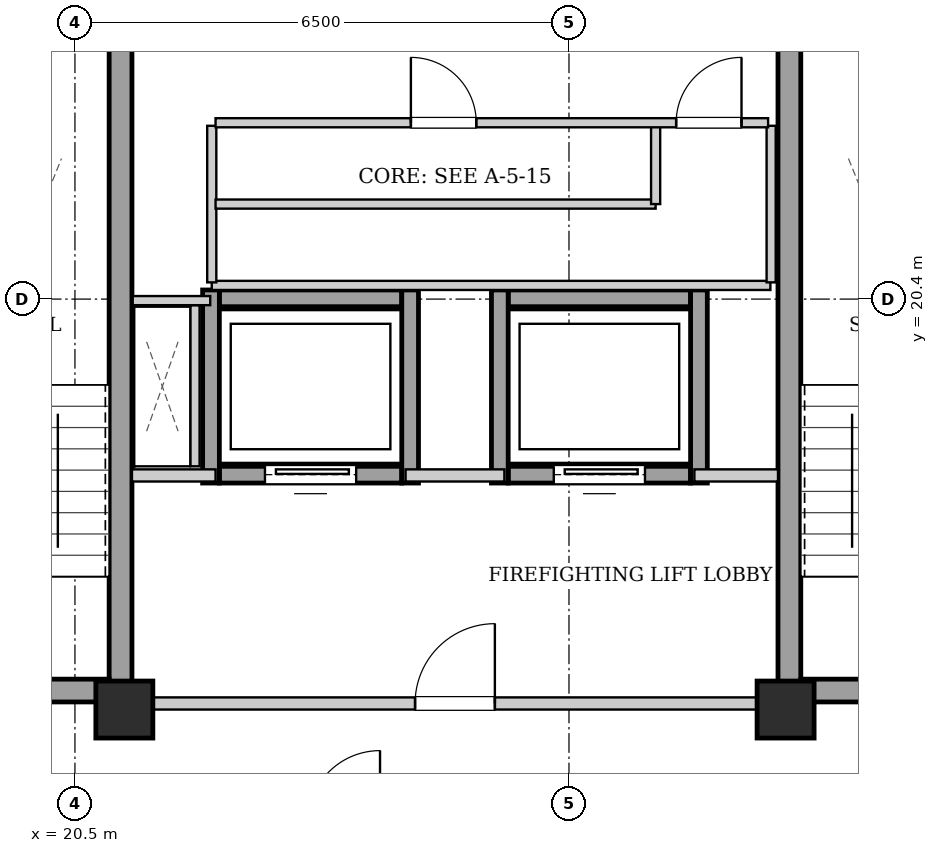
"""IFC4 building model, lengths in metres.
Left out: names, types, materials, properties, quantities, classifications, styles, units other than length and angle.
Written with IfcOpenShell. Run it as: python <this file> out.ifc"""

import sys

from ifc_helpers import new_model, si_unit, direction, frame, frame_2d, origin, origin_2d, place, context, subcontext, project, spatial, rectangle, extrude, element, fill, save


model = new_model("IFC4")
c1 = context("Model", 3, precision=1e-05, world=origin(), true_north=direction((0.0, 1.0)))
c2 = subcontext(c1, "Body", "Model", "MODEL_VIEW")
j1 = project(units=[si_unit("LENGTHUNIT", "METRE"), si_unit("PLANEANGLEUNIT", "RADIAN")], contexts=[c1])
p1 = place(None, origin())
s1 = spatial("IfcSite", under=j1, at=p1, CompositionType="ELEMENT")
p2 = place(p1, origin())
s2 = spatial("IfcBuilding", under=s1, at=p2, CompositionType="ELEMENT")
p3 = place(p2, frame((0.0, 0.0, 241.1)))
s3 = spatial("IfcBuildingStorey", under=s2, at=p3, CompositionType="ELEMENT", Elevation=241.1)
for number, where, z_axis, x_axis in (
    (1, (21.15, 15.0, 0.0), (0.0, 0.0, 1.0), (1.0, 0.0, 0.0)),
    (2, (29.85, 15.0, 0.0), (0.0, 0.0, 1.0), (1.0, 0.0, 0.0)),
):
    element("IfcColumn", number, at=place(p3, frame(where, z_axis=z_axis, x_axis=x_axis)), inside=s3, PredefinedType="COLUMN", context=c2, shape_type="SweptSolid", body=[
        extrude(rectangle(XDim=0.75, YDim=0.75, at=origin_2d()), origin(), (0.0, 0.0, 1.0), 3.4),
    ])
p4 = place(p3, frame((21.1, 15.1, 0.0), z_axis=(0.0, 0.0, 1.0), x_axis=(0.0, 1.0, 0.0)))
e3 = element("IfcWall", 3, at=p4, inside=s3, PredefinedType="SHEAR", context=c2, shape_type="SweptSolid", body=[
    extrude(rectangle(XDim=9.0, YDim=0.3, at=frame_2d((4.5, 0.0))), origin(), (0.0, 0.0, 1.0), 3.14),
])
p5 = place(p3, frame((18.1, 15.25, 0.0), z_axis=(0.0, 0.0, 1.0), x_axis=(1.0, 0.0, 0.0)))
e4 = element("IfcWall", 4, at=p5, inside=s3, PredefinedType="SHEAR", context=c2, shape_type="SweptSolid", body=[
    extrude(rectangle(XDim=2.85, YDim=0.3, at=frame_2d((1.425, 0.0))), origin(), (0.0, 0.0, 1.0), 3.14),
])
p6 = place(p5, frame((0.86, 0.0, 0.0)))
e5 = element("IfcOpeningElement", 5, at=p6, cuts=e4, PredefinedType="OPENING", context=c2, shape_type="SweptSolid", body=[
    extrude(rectangle(XDim=1.1, YDim=2.05, at=frame_2d((0.55, 1.025))), frame((0.0, 0.16, 0.0), z_axis=(0.0, -1.0, 0.0), x_axis=(1.0, 0.0, 0.0)), (0.0, 0.0, 1.0), 0.32),
])
p7 = place(p3, frame((29.9, 15.1, 0.0), z_axis=(0.0, 0.0, 1.0), x_axis=(0.0, 1.0, 0.0)))
e6 = element("IfcWall", 6, at=p7, inside=s3, PredefinedType="SHEAR", context=c2, shape_type="SweptSolid", body=[
    extrude(rectangle(XDim=9.0, YDim=0.3, at=frame_2d((4.5, 0.0))), origin(), (0.0, 0.0, 1.0), 3.14),
])
p8 = place(p3, frame((30.05, 15.25, 0.0), z_axis=(0.0, 0.0, 1.0), x_axis=(1.0, 0.0, 0.0)))
e7 = element("IfcWall", 7, at=p8, inside=s3, PredefinedType="SHEAR", context=c2, shape_type="SweptSolid", body=[
    extrude(rectangle(XDim=2.85, YDim=0.3, at=frame_2d((1.425, 0.0))), origin(), (0.0, 0.0, 1.0), 3.14),
])
p9 = place(p8, frame((0.86, 0.0, 0.0)))
e8 = element("IfcOpeningElement", 8, at=p9, cuts=e7, PredefinedType="OPENING", context=c2, shape_type="SweptSolid", body=[
    extrude(rectangle(XDim=1.1, YDim=2.05, at=frame_2d((0.55, 1.025))), frame((0.0, 0.16, 0.0), z_axis=(0.0, -1.0, 0.0), x_axis=(1.0, 0.0, 0.0)), (0.0, 0.0, 1.0), 0.32),
])
p10 = place(p3, frame((22.4, 18.09, 0.0), z_axis=(0.0, 0.0, 1.0), x_axis=(1.0, 0.0, 0.0)))
e9 = element("IfcWall", 9, at=p10, inside=s3, PredefinedType="SHEAR", context=c2, shape_type="SweptSolid", body=[
    extrude(rectangle(XDim=2.4, YDim=0.22, at=frame_2d((1.2, 0.0))), origin(), (0.0, 0.0, 1.0), 3.14),
])
p11 = place(p10, frame((0.6, 0.0, 0.0)))
e10 = element("IfcOpeningElement", 10, at=p11, cuts=e9, PredefinedType="OPENING", context=c2, shape_type="SweptSolid", body=[
    extrude(rectangle(XDim=1.2, YDim=2.15, at=frame_2d((0.6, 1.075))), frame((0.0, 0.12, 0.0), z_axis=(0.0, -1.0, 0.0), x_axis=(1.0, 0.0, 0.0)), (0.0, 0.0, 1.0), 0.24),
])
p12 = place(p3, frame((22.4, 20.41, 0.0), z_axis=(0.0, 0.0, 1.0), x_axis=(1.0, 0.0, 0.0)))
e11 = element("IfcWall", 11, at=p12, inside=s3, PredefinedType="SHEAR", context=c2, shape_type="SweptSolid", body=[
    extrude(rectangle(XDim=2.4, YDim=0.22, at=frame_2d((1.2, 0.0))), origin(), (0.0, 0.0, 1.0), 3.14),
])
for number, where, z_axis, x_axis in (
    (12, (22.29, 17.98, 0.0), (0.0, 0.0, 1.0), (0.0, 1.0, 0.0)),
    (13, (24.91, 17.98, 0.0), (0.0, 0.0, 1.0), (0.0, 1.0, 0.0)),
):
    element("IfcWall", number, at=place(p3, frame(where, z_axis=z_axis, x_axis=x_axis)), inside=s3, PredefinedType="SHEAR", context=c2, shape_type="SweptSolid", body=[
        extrude(rectangle(XDim=2.54, YDim=0.22, at=frame_2d((1.27, 0.0))), origin(), (0.0, 0.0, 1.0), 3.14),
    ])
p13 = place(p3, frame((26.2, 18.09, 0.0), z_axis=(0.0, 0.0, 1.0), x_axis=(1.0, 0.0, 0.0)))
e14 = element("IfcWall", 14, at=p13, inside=s3, PredefinedType="SHEAR", context=c2, shape_type="SweptSolid", body=[
    extrude(rectangle(XDim=2.4, YDim=0.22, at=frame_2d((1.2, 0.0))), origin(), (0.0, 0.0, 1.0), 3.14),
])
p14 = place(p13, frame((0.6, 0.0, 0.0)))
e15 = element("IfcOpeningElement", 15, at=p14, cuts=e14, PredefinedType="OPENING", context=c2, shape_type="SweptSolid", body=[
    extrude(rectangle(XDim=1.2, YDim=2.15, at=frame_2d((0.6, 1.075))), frame((0.0, 0.12, 0.0), z_axis=(0.0, -1.0, 0.0), x_axis=(1.0, 0.0, 0.0)), (0.0, 0.0, 1.0), 0.24),
])
p15 = place(p3, frame((26.2, 20.41, 0.0), z_axis=(0.0, 0.0, 1.0), x_axis=(1.0, 0.0, 0.0)))
e16 = element("IfcWall", 16, at=p15, inside=s3, PredefinedType="SHEAR", context=c2, shape_type="SweptSolid", body=[
    extrude(rectangle(XDim=2.4, YDim=0.22, at=frame_2d((1.2, 0.0))), origin(), (0.0, 0.0, 1.0), 3.14),
])
for number, where, z_axis, x_axis in (
    (17, (26.09, 17.98, 0.0), (0.0, 0.0, 1.0), (0.0, 1.0, 0.0)),
    (18, (28.71, 17.98, 0.0), (0.0, 0.0, 1.0), (0.0, 1.0, 0.0)),
):
    element("IfcWall", number, at=place(p3, frame(where, z_axis=z_axis, x_axis=x_axis)), inside=s3, PredefinedType="SHEAR", context=c2, shape_type="SweptSolid", body=[
        extrude(rectangle(XDim=2.54, YDim=0.22, at=frame_2d((1.27, 0.0))), origin(), (0.0, 0.0, 1.0), 3.14),
    ])
p16 = place(p3, frame((21.25, 15.08, 0.0), z_axis=(0.0, 0.0, 1.0), x_axis=(1.0, 0.0, 0.0)))
e19 = element("IfcWall", 19, at=p16, inside=s3, PredefinedType="PARTITIONING", context=c2, shape_type="SweptSolid", body=[
    extrude(rectangle(XDim=8.5, YDim=0.16, at=frame_2d((4.25, 0.0))), origin(), (0.0, 0.0, 1.0), 2.668),
])
p17 = place(p16, frame((3.725, 0.0, 0.0)))
e20 = element("IfcOpeningElement", 20, at=p17, cuts=e19, PredefinedType="OPENING", context=c2, shape_type="SweptSolid", body=[
    extrude(rectangle(XDim=1.05, YDim=2.05, at=frame_2d((0.525, 1.025))), frame((0.0, 0.09, 0.0), z_axis=(0.0, -1.0, 0.0), x_axis=(1.0, 0.0, 0.0)), (0.0, 0.0, 1.0), 0.18),
])
p18 = place(p3, frame((21.25, 18.08, 0.0), z_axis=(0.0, 0.0, 1.0), x_axis=(1.0, 0.0, 0.0)))
e21 = element("IfcWall", 21, at=p18, inside=s3, PredefinedType="PARTITIONING", context=c2, shape_type="SweptSolid", body=[
    extrude(rectangle(XDim=1.1, YDim=0.16, at=frame_2d((0.55, 0.0))), origin(), (0.0, 0.0, 1.0), 3.14),
])
p19 = place(p3, frame((24.85, 18.08, 0.0), z_axis=(0.0, 0.0, 1.0), x_axis=(1.0, 0.0, 0.0)))
e22 = element("IfcWall", 22, at=p19, inside=s3, PredefinedType="PARTITIONING", context=c2, shape_type="SweptSolid", body=[
    extrude(rectangle(XDim=1.3, YDim=0.16, at=frame_2d((0.65, 0.0))), origin(), (0.0, 0.0, 1.0), 3.14),
])
p20 = place(p3, frame((28.65, 18.08, 0.0), z_axis=(0.0, 0.0, 1.0), x_axis=(1.0, 0.0, 0.0)))
e23 = element("IfcWall", 23, at=p20, inside=s3, PredefinedType="PARTITIONING", context=c2, shape_type="SweptSolid", body=[
    extrude(rectangle(XDim=1.1, YDim=0.16, at=frame_2d((0.55, 0.0))), origin(), (0.0, 0.0, 1.0), 3.14),
])
p21 = place(p3, frame((22.08, 18.2, 0.0), z_axis=(0.0, 0.0, 1.0), x_axis=(0.0, 1.0, 0.0)))
e24 = element("IfcWall", 24, at=p21, inside=s3, PredefinedType="PARTITIONING", context=c2, shape_type="SweptSolid", body=[
    extrude(rectangle(XDim=2.12, YDim=0.12, at=frame_2d((1.06, 0.0))), origin(), (0.0, 0.0, 1.0), 3.14),
])
p22 = place(p3, frame((22.28, 20.38, 0.0), z_axis=(0.0, 0.0, 1.0), x_axis=(-1.0, 0.0, 0.0)))
e25 = element("IfcWall", 25, at=p22, inside=s3, PredefinedType="PARTITIONING", context=c2, shape_type="SweptSolid", body=[
    extrude(rectangle(XDim=1.02, YDim=0.12, at=frame_2d((0.51, 0.0))), origin(), (0.0, 0.0, 1.0), 3.14),
])
p23 = place(p3, frame((22.3, 20.58, 0.0), z_axis=(0.0, 0.0, 1.0), x_axis=(1.0, 0.0, 0.0)))
e26 = element("IfcWall", 26, at=p23, inside=s3, PredefinedType="PARTITIONING", context=c2, shape_type="SweptSolid", body=[
    extrude(rectangle(XDim=7.35, YDim=0.12, at=frame_2d((3.675, 0.0))), origin(), (0.0, 0.0, 1.0), 3.14),
])
for number, where, z_axis, x_axis in (
    (27, (22.3, 20.62, 0.0), (0.0, 0.0, 1.0), (0.0, 1.0, 0.0)),
    (28, (29.66, 20.62, 0.0), (0.0, 0.0, 1.0), (0.0, 1.0, 0.0)),
):
    element("IfcWall", number, at=place(p3, frame(where, z_axis=z_axis, x_axis=x_axis)), inside=s3, PredefinedType="PARTITIONING", context=c2, shape_type="SweptSolid", body=[
        extrude(rectangle(XDim=2.06, YDim=0.12, at=frame_2d((1.03, 0.0))), origin(), (0.0, 0.0, 1.0), 3.14),
    ])
p24 = place(p3, frame((22.35, 21.65, 0.0), z_axis=(0.0, 0.0, 1.0), x_axis=(1.0, 0.0, 0.0)))
e29 = element("IfcWall", 29, at=p24, inside=s3, PredefinedType="PARTITIONING", context=c2, shape_type="SweptSolid", body=[
    extrude(rectangle(XDim=5.79, YDim=0.12, at=frame_2d((2.895, 0.0))), origin(), (0.0, 0.0, 1.0), 3.14),
])
p25 = place(p3, frame((28.14, 21.65, 0.0), z_axis=(0.0, 0.0, 1.0), x_axis=(0.0, 1.0, 0.0)))
e30 = element("IfcWall", 30, at=p25, inside=s3, PredefinedType="PARTITIONING", context=c2, shape_type="SweptSolid", body=[
    extrude(rectangle(XDim=1.03, YDim=0.12, at=frame_2d((0.515, 0.0))), origin(), (0.0, 0.0, 1.0), 3.14),
])
p26 = place(p3, frame((22.35, 22.72, 0.0), z_axis=(0.0, 0.0, 1.0), x_axis=(1.0, 0.0, 0.0)))
e31 = element("IfcWall", 31, at=p26, inside=s3, PredefinedType="PARTITIONING", context=c2, shape_type="SweptSolid", body=[
    extrude(rectangle(XDim=7.27, YDim=0.12, at=frame_2d((3.635, 0.0))), origin(), (0.0, 0.0, 1.0), 3.14),
])
p27 = place(p26, frame((2.57, 0.0, 0.0)))
e32 = element("IfcOpeningElement", 32, at=p27, cuts=e31, PredefinedType="OPENING", context=c2, shape_type="SweptSolid", body=[
    extrude(rectangle(XDim=0.86, YDim=2.05, at=frame_2d((0.43, 1.025))), frame((0.0, 0.07, 0.0), z_axis=(0.0, -1.0, 0.0), x_axis=(1.0, 0.0, 0.0)), (0.0, 0.0, 1.0), 0.14),
])
p28 = place(p26, frame((6.06, 0.0, 0.0)))
e33 = element("IfcOpeningElement", 33, at=p28, cuts=e31, PredefinedType="OPENING", context=c2, shape_type="SweptSolid", body=[
    extrude(rectangle(XDim=0.86, YDim=2.05, at=frame_2d((0.43, 1.025))), frame((0.0, 0.07, 0.0), z_axis=(0.0, -1.0, 0.0), x_axis=(1.0, 0.0, 0.0)), (0.0, 0.0, 1.0), 0.14),
])
p29 = place(p11, origin())
e34 = element("IfcDoor", 34, at=p29, inside=s3, OperationType="SLIDING_TO_LEFT", PredefinedType="DOOR", context=c2, shape_type="SweptSolid", body=[
    extrude(rectangle(XDim=1.2, YDim=2.15, at=frame_2d((0.6, 1.075))), frame((0.0, 0.025, 0.0), z_axis=(0.0, -1.0, 0.0), x_axis=(1.0, 0.0, 0.0)), (0.0, 0.0, 1.0), 0.05),
])
fill(e10, e34)
p30 = place(p14, origin())
e35 = element("IfcDoor", 35, at=p30, inside=s3, OperationType="SLIDING_TO_LEFT", PredefinedType="DOOR", context=c2, shape_type="SweptSolid", body=[
    extrude(rectangle(XDim=1.2, YDim=2.15, at=frame_2d((0.6, 1.075))), frame((0.0, 0.025, 0.0), z_axis=(0.0, -1.0, 0.0), x_axis=(1.0, 0.0, 0.0)), (0.0, 0.0, 1.0), 0.05),
])
fill(e15, e35)
p31 = place(p17, origin())
e36 = element("IfcDoor", 36, at=p31, inside=s3, OperationType="SINGLE_SWING_RIGHT", PredefinedType="DOOR", context=c2, shape_type="SweptSolid", body=[
    extrude(rectangle(XDim=1.05, YDim=2.05, at=frame_2d((0.525, 1.025))), frame((0.0, 0.025, 0.0), z_axis=(0.0, -1.0, 0.0), x_axis=(1.0, 0.0, 0.0)), (0.0, 0.0, 1.0), 0.05),
])
fill(e20, e36)
p32 = place(p27, origin())
e37 = element("IfcDoor", 37, at=p32, inside=s3, OperationType="SINGLE_SWING_LEFT", PredefinedType="DOOR", context=c2, shape_type="SweptSolid", body=[
    extrude(rectangle(XDim=0.86, YDim=2.05, at=frame_2d((0.43, 1.025))), frame((0.0, 0.025, 0.0), z_axis=(0.0, -1.0, 0.0), x_axis=(1.0, 0.0, 0.0)), (0.0, 0.0, 1.0), 0.05),
])
fill(e32, e37)
p33 = place(p28, origin())
e38 = element("IfcDoor", 38, at=p33, inside=s3, OperationType="SINGLE_SWING_RIGHT", PredefinedType="DOOR", context=c2, shape_type="SweptSolid", body=[
    extrude(rectangle(XDim=0.86, YDim=2.05, at=frame_2d((0.43, 1.025))), frame((0.0, 0.025, 0.0), z_axis=(0.0, -1.0, 0.0), x_axis=(1.0, 0.0, 0.0)), (0.0, 0.0, 1.0), 0.05),
])
fill(e33, e38)
save(model, sys.argv[1])
